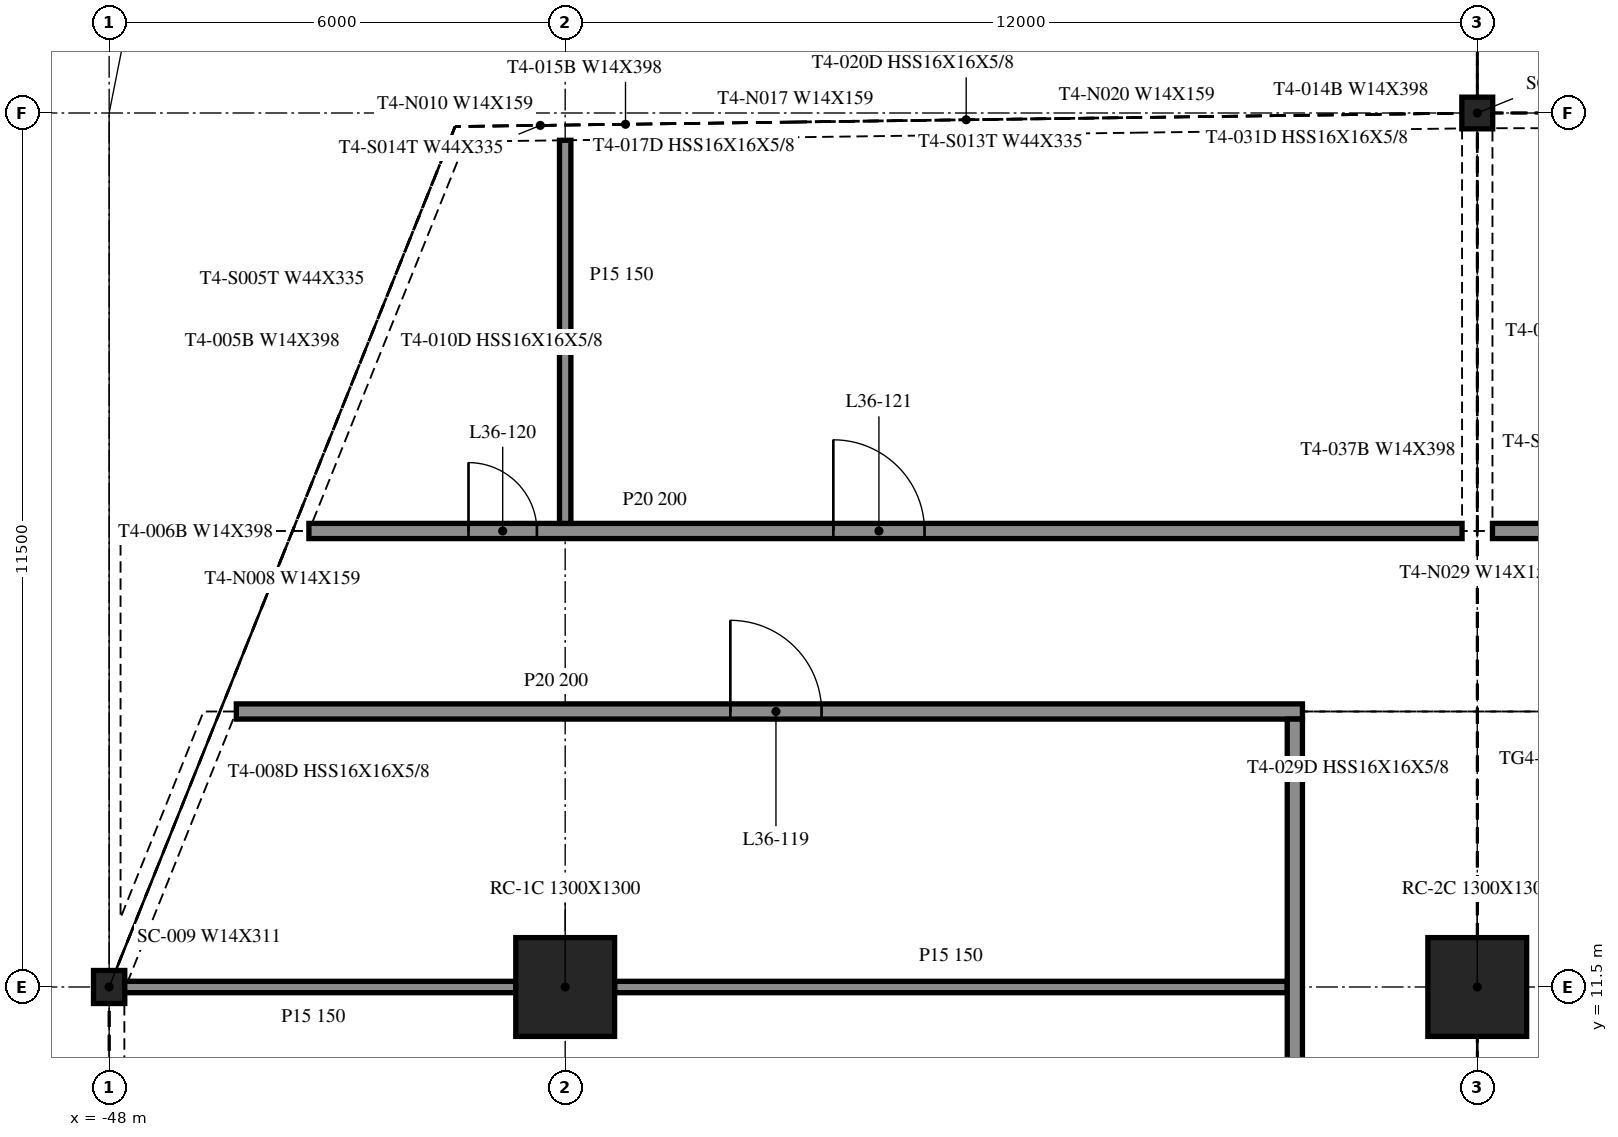
"""IFC4 building model, lengths in metres.
Left out: names, types, materials, properties, quantities, classifications, styles, units other than length and angle.
Written with IfcOpenShell. Run it as: python <this file> out.ifc"""

import sys

from ifc_helpers import new_model, si_unit, direction, frame, frame_2d, origin, origin_2d, place, context, subcontext, project, spatial, rectangle, i_section, extrude, element, fill, save


model = new_model("IFC4")
c1 = context("Model", 3, precision=1e-05, world=origin(), true_north=direction((0.0, 1.0)))
c2 = subcontext(c1, "Body", "Model", "MODEL_VIEW")
j1 = project(units=[si_unit("LENGTHUNIT", "METRE"), si_unit("PLANEANGLEUNIT", "RADIAN")], contexts=[c1])
p1 = place(None, origin())
s1 = spatial("IfcSite", under=j1, at=p1, CompositionType="ELEMENT")
p2 = place(p1, origin())
s2 = spatial("IfcBuilding", under=s1, at=p2, CompositionType="ELEMENT")
p3 = place(p2, frame((0.0, 0.0, 154.8)))
s3 = spatial("IfcBuildingStorey", under=s2, at=p3, CompositionType="ELEMENT", Elevation=154.8)
for number, where, z_axis, x_axis in (
    (1, (-42.0, 11.5, -0.55), (0.0, 0.0, 1.0), (1.0, 0.0, 0.0)),
    (2, (-30.0, 11.5, -0.55), (0.0, 0.0, 1.0), (1.0, 0.0, 0.0)),
):
    element("IfcColumn", number, at=place(p3, frame(where, z_axis=z_axis, x_axis=x_axis)), inside=s3, PredefinedType="COLUMN", context=c2, shape_type="SweptSolid", body=[
        extrude(rectangle(XDim=1.3, YDim=1.3, at=origin_2d()), origin(), (0.0, 0.0, 1.0), 4.61),
    ])
p4 = place(p3, frame((-48.0, 11.5, -0.55), z_axis=(0.0, 0.0, 1.0), x_axis=(1.0, 0.0, 0.0)))
e3 = element("IfcColumn", 3, at=p4, inside=s3, PredefinedType="COLUMN", context=c2, shape_type="SweptSolid", body=[
    extrude(i_section(OverallWidth=0.412, OverallDepth=0.434, WebThickness=0.036, FlangeThickness=0.057, at=origin_2d()), origin(), (0.0, 0.0, 1.0), 4.61),
])
p5 = place(p3, frame((-30.0, 23.0, -0.55), z_axis=(0.0, 0.0, 1.0), x_axis=(1.0, 0.0, 0.0)))
e4 = element("IfcColumn", 4, at=p5, inside=s3, PredefinedType="COLUMN", context=c2, shape_type="SweptSolid", body=[
    extrude(i_section(OverallWidth=0.406, OverallDepth=0.417, WebThickness=0.03, FlangeThickness=0.048, at=origin_2d()), origin(), (0.0, 0.0, 1.0), 4.61),
])
p6 = place(p3, frame((-47.975, 11.5, 0.0), z_axis=(0.0, 0.0, 1.0), x_axis=(1.0, 0.0, 0.0)))
e5 = element("IfcWall", 5, at=p6, inside=s3, PredefinedType="PARTITIONING", context=c2, shape_type="SweptSolid", body=[
    extrude(rectangle(XDim=5.325, YDim=0.15, at=frame_2d((2.663, 0.0))), origin(), (0.0, 0.0, 1.0), 4.06),
])
p7 = place(p3, frame((-41.35, 11.5, 0.0), z_axis=(0.0, 0.0, 1.0), x_axis=(1.0, 0.0, 0.0)))
e6 = element("IfcWall", 6, at=p7, inside=s3, PredefinedType="PARTITIONING", context=c2, shape_type="SweptSolid", body=[
    extrude(rectangle(XDim=8.85, YDim=0.15, at=frame_2d((4.425, 0.0))), origin(), (0.0, 0.0, 1.0), 4.06),
])
p8 = place(p3, frame((-46.327, 15.125, 0.0), z_axis=(0.0, 0.0, 1.0), x_axis=(1.0, 0.0, 0.0)))
e7 = element("IfcWall", 7, at=p8, inside=s3, PredefinedType="PARTITIONING", context=c2, shape_type="SweptSolid", body=[
    extrude(rectangle(XDim=14.027, YDim=0.2, at=frame_2d((7.013, 0.0))), origin(), (0.0, 0.0, 1.0), 4.06),
])
p9 = place(p8, frame((6.5, 0.0, 0.0)))
e8 = element("IfcOpeningElement", 8, at=p9, cuts=e7, PredefinedType="OPENING", context=c2, shape_type="SweptSolid", body=[
    extrude(rectangle(XDim=1.2, YDim=2.1, at=frame_2d((0.6, 1.05))), frame((0.0, 0.11, 0.0), z_axis=(0.0, -1.0, 0.0), x_axis=(1.0, 0.0, 0.0)), (0.0, 0.0, 1.0), 0.22),
])
p10 = place(p3, frame((-45.372, 17.5, 0.0), z_axis=(0.0, 0.0, 1.0), x_axis=(1.0, 0.0, 0.0)))
e9 = element("IfcWall", 9, at=p10, inside=s3, PredefinedType="PARTITIONING", context=c2, shape_type="SweptSolid", body=[
    extrude(rectangle(XDim=15.172, YDim=0.2, at=frame_2d((7.586, 0.0))), origin(), (0.0, 0.0, 1.0), 4.06),
])
p11 = place(p10, frame((2.1, 0.0, 0.0)))
e10 = element("IfcOpeningElement", 10, at=p11, cuts=e9, PredefinedType="OPENING", context=c2, shape_type="SweptSolid", body=[
    extrude(rectangle(XDim=0.9, YDim=2.1, at=frame_2d((0.45, 1.05))), frame((0.0, 0.11, 0.0), z_axis=(0.0, -1.0, 0.0), x_axis=(1.0, 0.0, 0.0)), (0.0, 0.0, 1.0), 0.22),
])
p12 = place(p10, frame((6.9, 0.0, 0.0)))
e11 = element("IfcOpeningElement", 11, at=p12, cuts=e9, PredefinedType="OPENING", context=c2, shape_type="SweptSolid", body=[
    extrude(rectangle(XDim=1.2, YDim=2.1, at=frame_2d((0.6, 1.05))), frame((0.0, 0.11, 0.0), z_axis=(0.0, -1.0, 0.0), x_axis=(1.0, 0.0, 0.0)), (0.0, 0.0, 1.0), 0.22),
])
p13 = place(p3, frame((-29.8, 17.5, 0.0), z_axis=(0.0, 0.0, 1.0), x_axis=(1.0, 0.0, 0.0)))
e12 = element("IfcWall", 12, at=p13, inside=s3, PredefinedType="PARTITIONING", context=c2, shape_type="SweptSolid", body=[
    extrude(rectangle(XDim=11.6, YDim=0.2, at=frame_2d((5.8, 0.0))), origin(), (0.0, 0.0, 1.0), 4.06),
])
p14 = place(p13, frame((5.1, 0.0, 0.0)))
e13 = element("IfcOpeningElement", 13, at=p14, cuts=e12, PredefinedType="OPENING", context=c2, shape_type="SweptSolid", body=[
    extrude(rectangle(XDim=1.2, YDim=2.1, at=frame_2d((0.6, 1.05))), frame((0.0, 0.11, 0.0), z_axis=(0.0, -1.0, 0.0), x_axis=(1.0, 0.0, 0.0)), (0.0, 0.0, 1.0), 0.22),
])
p15 = place(p3, frame((-42.0, 17.6, 0.0), z_axis=(0.0, 0.0, 1.0), x_axis=(0.0, 1.0, 0.0)))
e14 = element("IfcWall", 14, at=p15, inside=s3, PredefinedType="PARTITIONING", context=c2, shape_type="SweptSolid", body=[
    extrude(rectangle(XDim=5.041, YDim=0.15, at=frame_2d((2.521, 0.0))), origin(), (0.0, 0.0, 1.0), 4.06),
])
p16 = place(p3, frame((-32.4, -9.025, 0.0), z_axis=(0.0, 0.0, 1.0), x_axis=(0.0, 1.0, 0.0)))
e15 = element("IfcWall", 15, at=p16, inside=s3, PredefinedType="PARTITIONING", context=c2, shape_type="SweptSolid", body=[
    extrude(rectangle(XDim=24.05, YDim=0.2, at=frame_2d((12.025, 0.0))), origin(), (0.0, 0.0, 1.0), 4.06),
])
p17 = place(p16, frame((11.5, 0.0, 0.0)))
e16 = element("IfcOpeningElement", 16, at=p17, cuts=e15, PredefinedType="OPENING", context=c2, shape_type="SweptSolid", body=[
    extrude(rectangle(XDim=0.9, YDim=2.1, at=frame_2d((0.45, 1.05))), frame((0.0, 0.11, 0.0), z_axis=(0.0, -1.0, 0.0), x_axis=(1.0, 0.0, 0.0)), (0.0, 0.0, 1.0), 0.22),
])
p18 = place(p9, origin())
e17 = element("IfcDoor", 17, at=p18, inside=s3, OperationType="SINGLE_SWING_LEFT", PredefinedType="DOOR", context=c2, shape_type="SweptSolid", body=[
    extrude(rectangle(XDim=1.2, YDim=2.1, at=frame_2d((0.6, 1.05))), frame((0.0, 0.025, 0.0), z_axis=(0.0, -1.0, 0.0), x_axis=(1.0, 0.0, 0.0)), (0.0, 0.0, 1.0), 0.05),
])
fill(e8, e17)
p19 = place(p11, origin())
e18 = element("IfcDoor", 18, at=p19, inside=s3, OperationType="SINGLE_SWING_LEFT", PredefinedType="DOOR", context=c2, shape_type="SweptSolid", body=[
    extrude(rectangle(XDim=0.9, YDim=2.1, at=frame_2d((0.45, 1.05))), frame((0.0, 0.025, 0.0), z_axis=(0.0, -1.0, 0.0), x_axis=(1.0, 0.0, 0.0)), (0.0, 0.0, 1.0), 0.05),
])
fill(e10, e18)
p20 = place(p12, origin())
e19 = element("IfcDoor", 19, at=p20, inside=s3, OperationType="SINGLE_SWING_LEFT", PredefinedType="DOOR", context=c2, shape_type="SweptSolid", body=[
    extrude(rectangle(XDim=1.2, YDim=2.1, at=frame_2d((0.6, 1.05))), frame((0.0, 0.025, 0.0), z_axis=(0.0, -1.0, 0.0), x_axis=(1.0, 0.0, 0.0)), (0.0, 0.0, 1.0), 0.05),
])
fill(e11, e19)
save(model, sys.argv[1])
